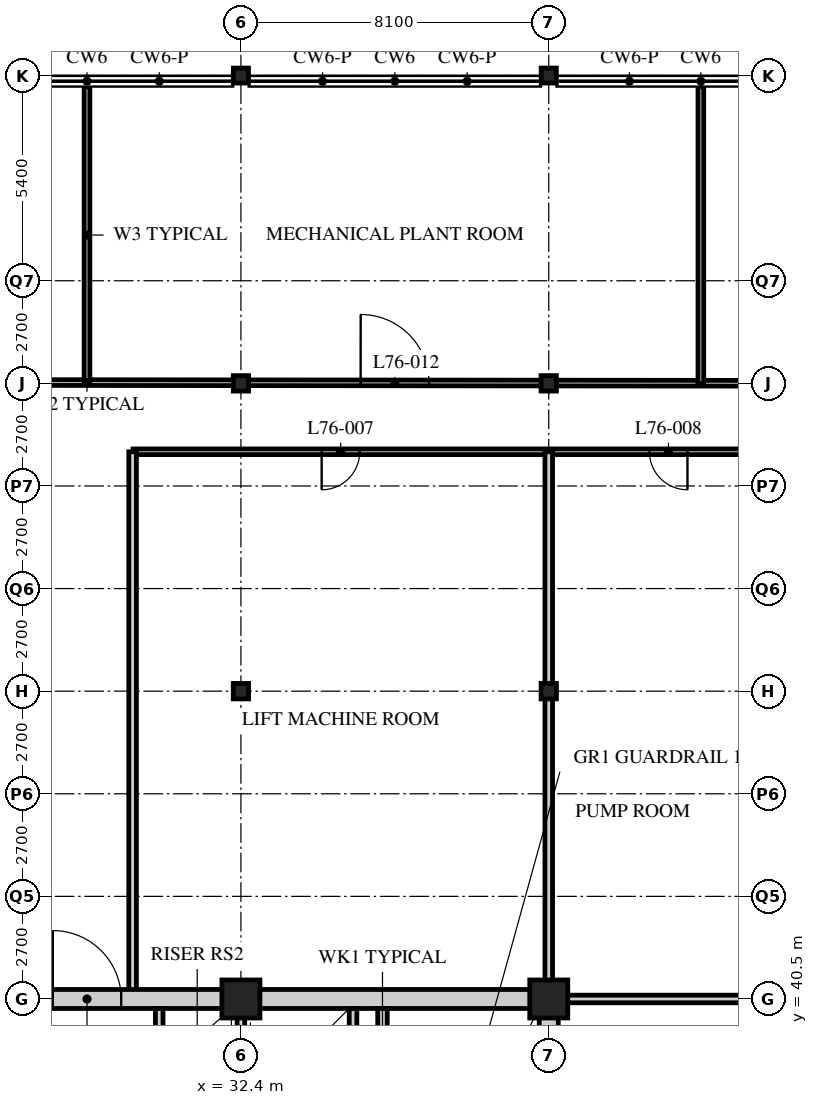
"""IFC4 building model, lengths in metres.
Left out: names, types, materials, properties, quantities, classifications, styles, units other than length and angle.
Written with IfcOpenShell. Run it as: python <this file> out.ifc"""

import sys

from ifc_helpers import new_model, si_unit, direction, frame, frame_2d, origin, origin_2d, place, context, subcontext, project, spatial, rectangle, hollow_rectangle, i_section, extrude, element, fill, save


model = new_model("IFC4")
c1 = context("Model", 3, precision=1e-05, world=origin(), true_north=direction((0.0, 1.0)))
c2 = subcontext(c1, "Body", "Model", "MODEL_VIEW")
j1 = project(units=[si_unit("LENGTHUNIT", "METRE"), si_unit("PLANEANGLEUNIT", "RADIAN")], contexts=[c1])
p1 = place(None, origin())
s1 = spatial("IfcSite", under=j1, at=p1, CompositionType="ELEMENT")
p2 = place(p1, origin())
s2 = spatial("IfcBuilding", under=s1, at=p2, CompositionType="ELEMENT")
p3 = place(p2, frame((0.0, 0.0, 298.5)))
s3 = spatial("IfcBuildingStorey", under=s2, at=p3, CompositionType="ELEMENT", Elevation=298.5)
p4 = place(p3, frame((32.4, 40.5, 0.0), z_axis=(0.0, 0.0, 1.0), x_axis=(1.0, 0.0, 0.0)))
e1 = element("IfcColumn", 1, at=p4, inside=s3, PredefinedType="COLUMN", context=c2, shape_type="SweptSolid", body=[
    extrude(hollow_rectangle(XDim=1.0, YDim=1.0, WallThickness=0.1, at=origin_2d()), origin(), (0.0, 0.0, 1.0), 5.4),
])
for number, where, z_axis, x_axis in (
    (2, (32.4, 48.6, 0.0), (0.0, 0.0, 1.0), (1.0, 0.0, 0.0)),
    (3, (32.4, 56.7, 0.0), (0.0, 0.0, 1.0), (1.0, 0.0, 0.0)),
):
    element("IfcColumn", number, at=place(p3, frame(where, z_axis=z_axis, x_axis=x_axis)), inside=s3, PredefinedType="COLUMN", context=c2, shape_type="SweptSolid", body=[
        extrude(i_section(OverallWidth=0.403, OverallDepth=0.406, WebThickness=0.027, FlangeThickness=0.043, FilletRadius=0.015, at=origin_2d()), origin(), (0.0, 0.0, 1.0), 5.4),
    ])
p5 = place(p3, frame((32.4, 64.8, 0.0), z_axis=(0.0, 0.0, 1.0), x_axis=(1.0, 0.0, 0.0)))
e4 = element("IfcColumn", 4, at=p5, inside=s3, PredefinedType="COLUMN", context=c2, shape_type="SweptSolid", body=[
    extrude(i_section(OverallWidth=0.399, OverallDepth=0.394, WebThickness=0.023, FlangeThickness=0.037, FilletRadius=0.015, at=origin_2d()), origin(), (0.0, 0.0, 1.0), 5.4),
])
p6 = place(p3, frame((40.5, 40.5, 0.0), z_axis=(0.0, 0.0, 1.0), x_axis=(1.0, 0.0, 0.0)))
e5 = element("IfcColumn", 5, at=p6, inside=s3, PredefinedType="COLUMN", context=c2, shape_type="SweptSolid", body=[
    extrude(hollow_rectangle(XDim=1.0, YDim=1.0, WallThickness=0.1, at=origin_2d()), origin(), (0.0, 0.0, 1.0), 5.4),
])
for number, where, z_axis, x_axis in (
    (6, (40.5, 48.6, 0.0), (0.0, 0.0, 1.0), (1.0, 0.0, 0.0)),
    (7, (40.5, 56.7, 0.0), (0.0, 0.0, 1.0), (1.0, 0.0, 0.0)),
):
    element("IfcColumn", number, at=place(p3, frame(where, z_axis=z_axis, x_axis=x_axis)), inside=s3, PredefinedType="COLUMN", context=c2, shape_type="SweptSolid", body=[
        extrude(i_section(OverallWidth=0.403, OverallDepth=0.406, WebThickness=0.027, FlangeThickness=0.043, FilletRadius=0.015, at=origin_2d()), origin(), (0.0, 0.0, 1.0), 5.4),
    ])
p7 = place(p3, frame((40.5, 64.8, 0.0), z_axis=(0.0, 0.0, 1.0), x_axis=(1.0, 0.0, 0.0)))
e8 = element("IfcColumn", 8, at=p7, inside=s3, PredefinedType="COLUMN", context=c2, shape_type="SweptSolid", body=[
    extrude(i_section(OverallWidth=0.399, OverallDepth=0.394, WebThickness=0.023, FlangeThickness=0.037, FilletRadius=0.015, at=origin_2d()), origin(), (0.0, 0.0, 1.0), 5.4),
])
p8 = place(p3, frame((8.1, 56.74, 0.0), z_axis=(0.0, 0.0, 1.0), x_axis=(0.999999511317, -0.000988618344, 0.0)))
e9 = element("IfcWall", 9, at=p8, inside=s3, PredefinedType="PARTITIONING", context=c2, shape_type="SweptSolid", body=[
    extrude(rectangle(XDim=40.5, YDim=0.15, at=frame_2d((20.25, 0.0))), origin(), (0.0, 0.0, 1.0), 4.428),
])
p9 = place(p8, frame((11.25, 0.0, 0.0)))
e10 = element("IfcOpeningElement", 10, at=p9, cuts=e9, PredefinedType="OPENING", context=c2, shape_type="SweptSolid", body=[
    extrude(rectangle(XDim=1.8, YDim=2.4, at=frame_2d((0.9, 1.2))), frame((0.0, 0.085, 0.0), z_axis=(0.0, -1.0, 0.0), x_axis=(1.0, 0.0, 0.0)), (0.0, 0.0, 1.0), 0.17),
])
p10 = place(p8, frame((27.45, 0.0, 0.0)))
e11 = element("IfcOpeningElement", 11, at=p10, cuts=e9, PredefinedType="OPENING", context=c2, shape_type="SweptSolid", body=[
    extrude(rectangle(XDim=1.8, YDim=2.4, at=frame_2d((0.9, 1.2))), frame((0.0, 0.085, 0.0), z_axis=(0.0, -1.0, 0.0), x_axis=(1.0, 0.0, 0.0)), (0.0, 0.0, 1.0), 0.17),
])
p11 = place(p8, frame((37.975, 0.0, 0.0)))
e12 = element("IfcOpeningElement", 12, at=p11, cuts=e9, PredefinedType="OPENING", context=c2, shape_type="SweptSolid", body=[
    extrude(rectangle(XDim=1.0, YDim=2.1, at=frame_2d((0.5, 1.05))), frame((0.0, 0.085, 0.0), z_axis=(0.0, -1.0, 0.0), x_axis=(1.0, 0.0, 0.0)), (0.0, 0.0, 1.0), 0.17),
])
p12 = place(p8, frame((1.525, 0.0, 0.0)))
e13 = element("IfcOpeningElement", 13, at=p12, cuts=e9, PredefinedType="OPENING", context=c2, shape_type="SweptSolid", body=[
    extrude(rectangle(XDim=1.0, YDim=2.1, at=frame_2d((0.5, 1.05))), frame((0.0, 0.085, 0.0), z_axis=(0.0, -1.0, 0.0), x_axis=(1.0, 0.0, 0.0)), (0.0, 0.0, 1.0), 0.17),
])
p13 = place(p3, frame((46.8, 54.9, 0.0), z_axis=(0.0, 0.0, 1.0), x_axis=(-1.0, 0.0, 0.0)))
e14 = element("IfcWall", 14, at=p13, inside=s3, PredefinedType="PARTITIONING", context=c2, shape_type="SweptSolid", body=[
    extrude(rectangle(XDim=17.24, YDim=0.15, at=frame_2d((8.62, 0.0))), origin(), (0.0, 0.0, 1.0), 5.19),
])
p14 = place(p13, frame((11.275, 0.0, 0.0)))
e15 = element("IfcOpeningElement", 15, at=p14, cuts=e14, PredefinedType="OPENING", context=c2, shape_type="SweptSolid", body=[
    extrude(rectangle(XDim=1.0, YDim=2.1, at=frame_2d((0.5, 1.05))), frame((0.0, 0.085, 0.0), z_axis=(0.0, -1.0, 0.0), x_axis=(1.0, 0.0, 0.0)), (0.0, 0.0, 1.0), 0.17),
])
p15 = place(p13, frame((2.65, 0.0, 0.0)))
e16 = element("IfcOpeningElement", 16, at=p15, cuts=e14, PredefinedType="OPENING", context=c2, shape_type="SweptSolid", body=[
    extrude(rectangle(XDim=1.0, YDim=2.1, at=frame_2d((0.5, 1.05))), frame((0.0, 0.085, 0.0), z_axis=(0.0, -1.0, 0.0), x_axis=(1.0, 0.0, 0.0)), (0.0, 0.0, 1.0), 0.17),
])
p16 = place(p3, frame((40.5, 40.5, 0.0), z_axis=(0.0, 0.0, 1.0), x_axis=(0.0, 1.0, 0.0)))
e17 = element("IfcWall", 17, at=p16, inside=s3, PredefinedType="SOLIDWALL", context=c2, shape_type="SweptSolid", body=[
    extrude(rectangle(XDim=14.4, YDim=0.2, at=frame_2d((7.2, 0.0))), origin(), (0.0, 0.0, 1.0), 4.428),
])
p17 = place(p3, frame((29.55, 40.5, 0.0), z_axis=(0.0, 0.0, 1.0), x_axis=(0.0, 1.0, 0.0)))
e18 = element("IfcWall", 18, at=p17, inside=s3, PredefinedType="SOLIDWALL", context=c2, shape_type="SweptSolid", body=[
    extrude(rectangle(XDim=14.4, YDim=0.2, at=frame_2d((7.2, 0.0))), origin(), (0.0, 0.0, 1.0), 5.19),
])
p18 = place(p3, frame((40.5, 40.5, 0.0), z_axis=(0.0, 0.0, 1.0), x_axis=(1.0, 0.0, 0.0)))
e19 = element("IfcWall", 19, at=p18, inside=s3, PredefinedType="SOLIDWALL", context=c2, shape_type="SweptSolid", body=[
    extrude(rectangle(XDim=6.3, YDim=0.2, at=frame_2d((3.15, 0.0))), origin(), (0.0, 0.0, 1.0), 4.428),
])
for number, where, z_axis, x_axis in (
    (20, (28.35, 56.7, 0.0), (0.0, 0.0, 1.0), (0.0, 1.0, 0.0)),
    (21, (44.502, 56.7, 0.0), (0.0, 0.0, 1.0), (0.0, 1.0, 0.0)),
):
    element("IfcWall", number, at=place(p3, frame(where, z_axis=z_axis, x_axis=x_axis)), inside=s3, PredefinedType="PARTITIONING", context=c2, shape_type="SweptSolid", body=[
        extrude(rectangle(XDim=7.807, YDim=0.15, at=frame_2d((3.904, 0.0))), origin(), (0.0, 0.0, 1.0), 5.19),
    ])
p19 = place(p3, frame((15.95, 40.5, 0.0), z_axis=(0.0, 0.0, 1.0), x_axis=(1.0, 0.0, 0.0)))
e22 = element("IfcWall", 22, at=p19, inside=s3, PredefinedType="SOLIDWALL", context=c2, shape_type="SweptSolid", body=[
    extrude(rectangle(XDim=24.8, YDim=0.5, at=frame_2d((12.4, 0.0))), origin(), (0.0, 0.0, 1.0), 4.428),
])
p20 = place(p19, frame((11.5, 0.0, 0.0)))
e23 = element("IfcOpeningElement", 23, at=p20, cuts=e22, PredefinedType="OPENING", context=c2, shape_type="SweptSolid", body=[
    extrude(rectangle(XDim=1.8, YDim=2.4, at=frame_2d((0.9, 1.2))), frame((0.0, 0.26, 0.0), z_axis=(0.0, -1.0, 0.0), x_axis=(1.0, 0.0, 0.0)), (0.0, 0.0, 1.0), 0.52),
])
p21 = place(p3, frame((40.5, 24.55, 0.0), z_axis=(0.0, 0.0, 1.0), x_axis=(0.0, 1.0, 0.0)))
e24 = element("IfcWall", 24, at=p21, inside=s3, PredefinedType="SOLIDWALL", context=c2, shape_type="SweptSolid", body=[
    extrude(rectangle(XDim=15.7, YDim=0.5, at=frame_2d((7.85, 0.0))), origin(), (0.0, 0.0, 1.0), 4.428),
])
p22 = place(p3, frame((32.4, 32.5, 0.0), z_axis=(0.0, 0.0, 1.0), x_axis=(0.0, 1.0, 0.0)))
e25 = element("IfcWall", 25, at=p22, inside=s3, PredefinedType="SOLIDWALL", context=c2, shape_type="SweptSolid", body=[
    extrude(rectangle(XDim=7.75, YDim=0.2, at=frame_2d((3.875, 0.0))), origin(), (0.0, 0.0, 1.0), 4.428),
])
p23 = place(p22, frame((1.9, 0.0, 0.0)))
e26 = element("IfcOpeningElement", 26, at=p23, cuts=e25, PredefinedType="OPENING", context=c2, shape_type="SweptSolid", body=[
    extrude(rectangle(XDim=1.2, YDim=2.1, at=frame_2d((0.6, 1.05))), frame((0.0, 0.11, 0.0), z_axis=(0.0, -1.0, 0.0), x_axis=(1.0, 0.0, 0.0)), (0.0, 0.0, 1.0), 0.22),
])
p24 = place(p3, frame((36.125, 32.5, 0.0), z_axis=(0.0, 0.0, 1.0), x_axis=(0.0, 1.0, 0.0)))
e27 = element("IfcWall", 27, at=p24, inside=s3, PredefinedType="SOLIDWALL", context=c2, shape_type="SweptSolid", body=[
    extrude(rectangle(XDim=7.75, YDim=0.25, at=frame_2d((3.875, 0.0))), origin(), (0.0, 0.0, 1.0), 5.19),
])
p25 = place(p24, frame((0.45, 0.0, 0.0)))
e28 = element("IfcOpeningElement", 28, at=p25, cuts=e27, PredefinedType="OPENING", context=c2, shape_type="SweptSolid", body=[
    extrude(rectangle(XDim=1.2, YDim=2.1, at=frame_2d((0.6, 1.05))), frame((0.0, 0.135, 0.0), z_axis=(0.0, -1.0, 0.0), x_axis=(1.0, 0.0, 0.0)), (0.0, 0.0, 1.0), 0.27),
])
p26 = place(p3, frame((35.35, 37.65, 0.0), z_axis=(0.0, 0.0, 1.0), x_axis=(0.0, 1.0, 0.0)))
e29 = element("IfcWall", 29, at=p26, inside=s3, PredefinedType="SOLIDWALL", context=c2, shape_type="SweptSolid", body=[
    extrude(rectangle(XDim=2.6, YDim=0.2, at=frame_2d((1.3, 0.0))), origin(), (0.0, 0.0, 1.0), 5.19),
])
p27 = place(p3, frame((30.25, 38.65, 0.0), z_axis=(0.0, 0.0, 1.0), x_axis=(0.0, 1.0, 0.0)))
e30 = element("IfcWall", 30, at=p27, inside=s3, PredefinedType="SOLIDWALL", context=c2, shape_type="SweptSolid", body=[
    extrude(rectangle(XDim=1.6, YDim=0.2, at=frame_2d((0.8, 0.0))), origin(), (0.0, 0.0, 1.0), 5.19),
])
p28 = place(p14, origin())
e31 = element("IfcDoor", 31, at=p28, inside=s3, OperationType="SINGLE_SWING_RIGHT", PredefinedType="DOOR", context=c2, shape_type="SweptSolid", body=[
    extrude(rectangle(XDim=1.0, YDim=2.1, at=frame_2d((0.5, 1.05))), frame((0.0, 0.025, 0.0), z_axis=(0.0, -1.0, 0.0), x_axis=(1.0, 0.0, 0.0)), (0.0, 0.0, 1.0), 0.05),
])
fill(e15, e31)
p29 = place(p15, origin())
e32 = element("IfcDoor", 32, at=p29, inside=s3, OperationType="SINGLE_SWING_LEFT", PredefinedType="DOOR", context=c2, shape_type="SweptSolid", body=[
    extrude(rectangle(XDim=1.0, YDim=2.1, at=frame_2d((0.5, 1.05))), frame((0.0, 0.025, 0.0), z_axis=(0.0, -1.0, 0.0), x_axis=(1.0, 0.0, 0.0)), (0.0, 0.0, 1.0), 0.05),
])
fill(e16, e32)
p30 = place(p10, origin())
e33 = element("IfcDoor", 33, at=p30, inside=s3, OperationType="DOUBLE_DOOR_SINGLE_SWING", PredefinedType="DOOR", context=c2, shape_type="SweptSolid", body=[
    extrude(rectangle(XDim=1.8, YDim=2.4, at=frame_2d((0.9, 1.2))), frame((0.0, 0.025, 0.0), z_axis=(0.0, -1.0, 0.0), x_axis=(1.0, 0.0, 0.0)), (0.0, 0.0, 1.0), 0.05),
])
fill(e11, e33)
p31 = place(p20, origin())
e34 = element("IfcDoor", 34, at=p31, inside=s3, OperationType="DOUBLE_DOOR_SINGLE_SWING", PredefinedType="DOOR", context=c2, shape_type="SweptSolid", body=[
    extrude(rectangle(XDim=1.8, YDim=2.4, at=frame_2d((0.9, 1.2))), frame((0.0, 0.025, 0.0), z_axis=(0.0, -1.0, 0.0), x_axis=(1.0, 0.0, 0.0)), (0.0, 0.0, 1.0), 0.05),
])
fill(e23, e34)
save(model, sys.argv[1])
